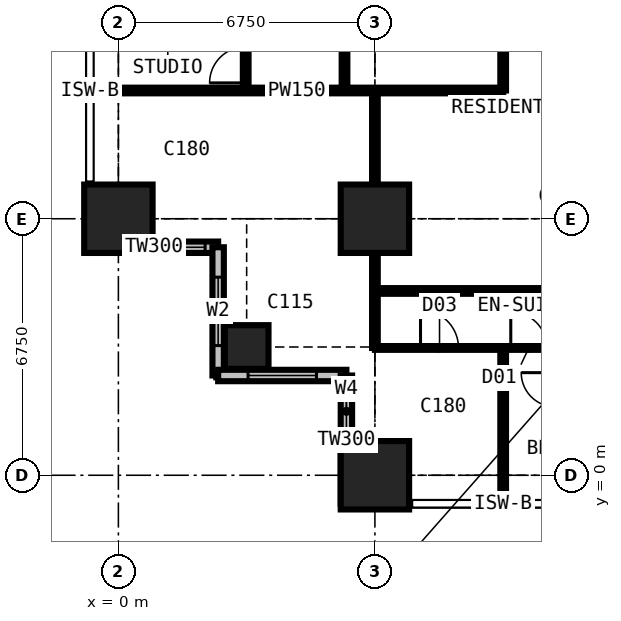
"""IFC4 building model, lengths in metres.
Left out: names, types, materials, properties, quantities, classifications, styles, units other than length and angle.
Written with IfcOpenShell. Run it as: python <this file> out.ifc"""

import sys

from ifc_helpers import new_model, si_unit, direction, frame, frame_2d, origin, origin_2d, place, context, subcontext, project, spatial, rectangle, extrude, element, fill, save


model = new_model("IFC4")
c1 = context("Model", 3, precision=1e-05, world=origin(), true_north=direction((0.0, 1.0)))
c2 = subcontext(c1, "Body", "Model", "MODEL_VIEW")
j1 = project(units=[si_unit("LENGTHUNIT", "METRE"), si_unit("PLANEANGLEUNIT", "RADIAN")], contexts=[c1])
p1 = place(None, origin())
s1 = spatial("IfcSite", under=j1, at=p1, CompositionType="ELEMENT")
p2 = place(p1, origin())
s2 = spatial("IfcBuilding", under=s1, at=p2, CompositionType="ELEMENT")
p3 = place(p2, frame((0.0, 0.0, 87.3)))
s3 = spatial("IfcBuildingStorey", under=s2, at=p3, CompositionType="ELEMENT", Elevation=87.3)
p4 = place(p3, frame((0.0, 6.75, 0.0), z_axis=(0.0, 0.0, 1.0), x_axis=(1.0, 0.0, 0.0)))
e1 = element("IfcColumn", 1, at=p4, inside=s3, PredefinedType="COLUMN", context=c2, shape_type="SweptSolid", body=[
    extrude(rectangle(XDim=1.8, YDim=1.8, at=origin_2d()), origin(), (0.0, 0.0, 1.0), 3.6),
])
p5 = place(p3, frame((3.375, 3.375, 0.0), z_axis=(0.0, 0.0, 1.0), x_axis=(1.0, 0.0, 0.0)))
e2 = element("IfcColumn", 2, at=p5, inside=s3, PredefinedType="COLUMN", context=c2, shape_type="SweptSolid", body=[
    extrude(rectangle(XDim=1.15, YDim=1.15, at=origin_2d()), origin(), (0.0, 0.0, 1.0), 3.6),
])
for number, where, z_axis, x_axis in (
    (3, (6.75, 0.0, 0.0), (0.0, 0.0, 1.0), (1.0, 0.0, 0.0)),
    (4, (6.75, 6.75, 0.0), (0.0, 0.0, 1.0), (1.0, 0.0, 0.0)),
):
    element("IfcColumn", number, at=place(p3, frame(where, z_axis=z_axis, x_axis=x_axis)), inside=s3, PredefinedType="COLUMN", context=c2, shape_type="SweptSolid", body=[
        extrude(rectangle(XDim=1.8, YDim=1.8, at=origin_2d()), origin(), (0.0, 0.0, 1.0), 3.6),
    ])
p6 = place(p3, frame((-0.75, 6.0, 0.0), z_axis=(0.0, 0.0, 1.0), x_axis=(1.0, 0.0, 0.0)))
e5 = element("IfcWall", 5, at=p6, inside=s3, PredefinedType="SOLIDWALL", context=c2, shape_type="SweptSolid", body=[
    extrude(rectangle(XDim=3.375, YDim=0.3, at=frame_2d((1.688, 0.0))), origin(), (0.0, 0.0, 1.0), 3.375),
])
p7 = place(p6, frame((1.833, 0.0, 0.9)))
e6 = element("IfcOpeningElement", 6, at=p7, cuts=e5, PredefinedType="OPENING", context=c2, shape_type="SweptSolid", body=[
    extrude(rectangle(XDim=1.2, YDim=1.8, at=frame_2d((0.6, 0.9))), frame((0.0, 0.16, 0.0), z_axis=(0.0, -1.0, 0.0), x_axis=(1.0, 0.0, 0.0)), (0.0, 0.0, 1.0), 0.32),
])
p8 = place(p3, frame((2.625, 6.0, 0.0), z_axis=(0.0, 0.0, 1.0), x_axis=(0.0, -1.0, 0.0)))
e7 = element("IfcWall", 7, at=p8, inside=s3, PredefinedType="SOLIDWALL", context=c2, shape_type="SweptSolid", body=[
    extrude(rectangle(XDim=3.375, YDim=0.3, at=frame_2d((1.688, 0.0))), origin(), (0.0, 0.0, 1.0), 3.375),
])
p9 = place(p8, frame((0.788, 0.0, 0.6)))
e8 = element("IfcOpeningElement", 8, at=p9, cuts=e7, PredefinedType="OPENING", context=c2, shape_type="SweptSolid", body=[
    extrude(rectangle(XDim=1.8, YDim=2.1, at=frame_2d((0.9, 1.05))), frame((0.0, 0.16, 0.0), z_axis=(0.0, -1.0, 0.0), x_axis=(1.0, 0.0, 0.0)), (0.0, 0.0, 1.0), 0.32),
])
p10 = place(p3, frame((2.625, 2.625, 0.0), z_axis=(0.0, 0.0, 1.0), x_axis=(1.0, 0.0, 0.0)))
e9 = element("IfcWall", 9, at=p10, inside=s3, PredefinedType="SOLIDWALL", context=c2, shape_type="SweptSolid", body=[
    extrude(rectangle(XDim=3.375, YDim=0.3, at=frame_2d((1.688, 0.0))), origin(), (0.0, 0.0, 1.0), 3.375),
])
p11 = place(p10, frame((0.788, 0.0, 0.6)))
e10 = element("IfcOpeningElement", 10, at=p11, cuts=e9, PredefinedType="OPENING", context=c2, shape_type="SweptSolid", body=[
    extrude(rectangle(XDim=1.8, YDim=2.1, at=frame_2d((0.9, 1.05))), frame((0.0, 0.16, 0.0), z_axis=(0.0, -1.0, 0.0), x_axis=(1.0, 0.0, 0.0)), (0.0, 0.0, 1.0), 0.32),
])
p12 = place(p3, frame((6.0, 2.625, 0.0), z_axis=(0.0, 0.0, 1.0), x_axis=(0.0, -1.0, 0.0)))
e11 = element("IfcWall", 11, at=p12, inside=s3, PredefinedType="SOLIDWALL", context=c2, shape_type="SweptSolid", body=[
    extrude(rectangle(XDim=3.375, YDim=0.3, at=frame_2d((1.688, 0.0))), origin(), (0.0, 0.0, 1.0), 3.375),
])
p13 = place(p12, frame((0.343, 0.0, 0.9)))
e12 = element("IfcOpeningElement", 12, at=p13, cuts=e11, PredefinedType="OPENING", context=c2, shape_type="SweptSolid", body=[
    extrude(rectangle(XDim=1.2, YDim=1.8, at=frame_2d((0.6, 0.9))), frame((0.0, 0.16, 0.0), z_axis=(0.0, -1.0, 0.0), x_axis=(1.0, 0.0, 0.0)), (0.0, 0.0, 1.0), 0.32),
])
p14 = place(p3, frame((-0.734, 10.125, 0.0), z_axis=(0.0, 0.0, 1.0), x_axis=(1.0, 0.0, 0.0)))
e13 = element("IfcWall", 13, at=p14, inside=s3, PredefinedType="PARTITIONING", context=c2, shape_type="SweptSolid", body=[
    extrude(rectangle(XDim=10.859, YDim=0.15, at=frame_2d((5.429, 0.0))), origin(), (0.0, 0.0, 1.0), 3.375),
])
p15 = place(p3, frame((3.35, 10.125, 0.0), z_axis=(0.0, 0.0, 1.0), x_axis=(0.0, 1.0, 0.0)))
e14 = element("IfcWall", 14, at=p15, inside=s3, PredefinedType="PARTITIONING", context=c2, shape_type="SweptSolid", body=[
    extrude(rectangle(XDim=16.875, YDim=0.15, at=frame_2d((8.438, 0.0))), origin(), (0.0, 0.0, 1.0), 3.375),
])
p16 = place(p15, frame((7.575, 0.0, 0.0)))
e15 = element("IfcOpeningElement", 15, at=p16, cuts=e14, PredefinedType="OPENING", context=c2, shape_type="SweptSolid", body=[
    extrude(rectangle(XDim=0.95, YDim=2.2, at=frame_2d((0.475, 1.1))), frame((0.0, 0.085, 0.0), z_axis=(0.0, -1.0, 0.0), x_axis=(1.0, 0.0, 0.0)), (0.0, 0.0, 1.0), 0.17),
])
p17 = place(p15, frame((0.2, 0.0, 0.0)))
e16 = element("IfcOpeningElement", 16, at=p17, cuts=e14, PredefinedType="OPENING", context=c2, shape_type="SweptSolid", body=[
    extrude(rectangle(XDim=0.95, YDim=2.2, at=frame_2d((0.475, 1.1))), frame((0.0, 0.085, 0.0), z_axis=(0.0, -1.0, 0.0), x_axis=(1.0, 0.0, 0.0)), (0.0, 0.0, 1.0), 0.17),
])
p18 = place(p15, frame((10.375, 0.0, 0.0)))
e17 = element("IfcOpeningElement", 17, at=p18, cuts=e14, PredefinedType="OPENING", context=c2, shape_type="SweptSolid", body=[
    extrude(rectangle(XDim=0.95, YDim=2.2, at=frame_2d((0.475, 1.1))), frame((0.0, 0.085, 0.0), z_axis=(0.0, -1.0, 0.0), x_axis=(1.0, 0.0, 0.0)), (0.0, 0.0, 1.0), 0.17),
])
p19 = place(p3, frame((5.95, 10.125, 0.0), z_axis=(0.0, 0.0, 1.0), x_axis=(0.0, 1.0, 0.0)))
e18 = element("IfcWall", 18, at=p19, inside=s3, PredefinedType="PARTITIONING", context=c2, shape_type="SweptSolid", body=[
    extrude(rectangle(XDim=2.65, YDim=0.15, at=frame_2d((1.325, 0.0))), origin(), (0.0, 0.0, 1.0), 3.375),
])
p20 = place(p3, frame((6.75, 3.35, 0.0), z_axis=(0.0, 0.0, 1.0), x_axis=(0.0, 1.0, 0.0)))
e19 = element("IfcWall", 19, at=p20, inside=s3, PredefinedType="PARTITIONING", context=c2, shape_type="SweptSolid", body=[
    extrude(rectangle(XDim=6.775, YDim=0.15, at=frame_2d((3.387, 0.0))), origin(), (0.0, 0.0, 1.0), 2.877),
])
p21 = place(p3, frame((6.75, 3.35, 0.0), z_axis=(0.0, 0.0, 1.0), x_axis=(1.0, 0.0, 0.0)))
e20 = element("IfcWall", 20, at=p21, inside=s3, PredefinedType="PARTITIONING", context=c2, shape_type="SweptSolid", body=[
    extrude(rectangle(XDim=23.625, YDim=0.1, at=frame_2d((11.812, 0.0))), origin(), (0.0, 0.0, 1.0), 3.375),
])
p22 = place(p21, frame((1.2, 0.0, 0.0)))
e21 = element("IfcOpeningElement", 21, at=p22, cuts=e20, PredefinedType="OPENING", context=c2, shape_type="SweptSolid", body=[
    extrude(rectangle(XDim=1.0, YDim=2.2, at=frame_2d((0.5, 1.1))), frame((0.0, 0.06, 0.0), z_axis=(0.0, -1.0, 0.0), x_axis=(1.0, 0.0, 0.0)), (0.0, 0.0, 1.0), 0.12),
])
p23 = place(p21, frame((3.575, 0.0, 0.0)))
e22 = element("IfcOpeningElement", 22, at=p23, cuts=e20, PredefinedType="OPENING", context=c2, shape_type="SweptSolid", body=[
    extrude(rectangle(XDim=0.95, YDim=2.2, at=frame_2d((0.475, 1.1))), frame((0.0, 0.06, 0.0), z_axis=(0.0, -1.0, 0.0), x_axis=(1.0, 0.0, 0.0)), (0.0, 0.0, 1.0), 0.12),
])
p24 = place(p21, frame((6.95, 0.0, 0.0)))
e23 = element("IfcOpeningElement", 23, at=p24, cuts=e20, PredefinedType="OPENING", context=c2, shape_type="SweptSolid", body=[
    extrude(rectangle(XDim=0.95, YDim=2.2, at=frame_2d((0.475, 1.1))), frame((0.0, 0.06, 0.0), z_axis=(0.0, -1.0, 0.0), x_axis=(1.0, 0.0, 0.0)), (0.0, 0.0, 1.0), 0.12),
])
p25 = place(p21, frame((10.325, 0.0, 0.0)))
e24 = element("IfcOpeningElement", 24, at=p25, cuts=e20, PredefinedType="OPENING", context=c2, shape_type="SweptSolid", body=[
    extrude(rectangle(XDim=0.95, YDim=2.2, at=frame_2d((0.475, 1.1))), frame((0.0, 0.06, 0.0), z_axis=(0.0, -1.0, 0.0), x_axis=(1.0, 0.0, 0.0)), (0.0, 0.0, 1.0), 0.12),
])
p26 = place(p21, frame((15.1, 0.0, 0.0)))
e25 = element("IfcOpeningElement", 25, at=p26, cuts=e20, PredefinedType="OPENING", context=c2, shape_type="SweptSolid", body=[
    extrude(rectangle(XDim=0.95, YDim=2.2, at=frame_2d((0.475, 1.1))), frame((0.0, 0.06, 0.0), z_axis=(0.0, -1.0, 0.0), x_axis=(1.0, 0.0, 0.0)), (0.0, 0.0, 1.0), 0.12),
])
p27 = place(p21, frame((20.45, 0.0, 0.0)))
e26 = element("IfcOpeningElement", 26, at=p27, cuts=e20, PredefinedType="OPENING", context=c2, shape_type="SweptSolid", body=[
    extrude(rectangle(XDim=0.95, YDim=2.2, at=frame_2d((0.475, 1.1))), frame((0.0, 0.06, 0.0), z_axis=(0.0, -1.0, 0.0), x_axis=(1.0, 0.0, 0.0)), (0.0, 0.0, 1.0), 0.12),
])
p28 = place(p3, frame((6.75, 4.85, 0.0), z_axis=(0.0, 0.0, 1.0), x_axis=(1.0, 0.0, 0.0)))
e27 = element("IfcWall", 27, at=p28, inside=s3, PredefinedType="PARTITIONING", context=c2, shape_type="SweptSolid", body=[
    extrude(rectangle(XDim=11.05, YDim=0.15, at=frame_2d((5.525, 0.0))), origin(), (0.0, 0.0, 1.0), 3.375),
])
p29 = place(p3, frame((10.125, -0.734, 0.0), z_axis=(0.0, 0.0, 1.0), x_axis=(0.0, 1.0, 0.0)))
e28 = element("IfcWall", 28, at=p29, inside=s3, PredefinedType="PARTITIONING", context=c2, shape_type="SweptSolid", body=[
    extrude(rectangle(XDim=4.084, YDim=0.15, at=frame_2d((2.042, 0.0))), origin(), (0.0, 0.0, 1.0), 3.375),
])
p30 = place(p3, frame((10.125, 10.125, 0.0), z_axis=(0.0, 0.0, 1.0), x_axis=(0.0, 1.0, 0.0)))
e29 = element("IfcWall", 29, at=p30, inside=s3, PredefinedType="PARTITIONING", context=c2, shape_type="SweptSolid", body=[
    extrude(rectangle(XDim=1.175, YDim=0.15, at=frame_2d((0.587, 0.0))), origin(), (0.0, 0.0, 1.0), 3.375),
])
p31 = place(p7, origin())
e30 = element("IfcWindow", 30, at=p31, inside=s3, PartitioningType="SINGLE_PANEL", PredefinedType="WINDOW", context=c2, shape_type="SweptSolid", body=[
    extrude(rectangle(XDim=1.2, YDim=1.8, at=frame_2d((0.6, 0.9))), frame((0.0, 0.03, 0.0), z_axis=(0.0, -1.0, 0.0), x_axis=(1.0, 0.0, 0.0)), (0.0, 0.0, 1.0), 0.06),
])
fill(e6, e30)
p32 = place(p9, origin())
e31 = element("IfcWindow", 31, at=p32, inside=s3, PartitioningType="SINGLE_PANEL", PredefinedType="WINDOW", context=c2, shape_type="SweptSolid", body=[
    extrude(rectangle(XDim=1.8, YDim=2.1, at=frame_2d((0.9, 1.05))), frame((0.0, 0.03, 0.0), z_axis=(0.0, -1.0, 0.0), x_axis=(1.0, 0.0, 0.0)), (0.0, 0.0, 1.0), 0.06),
])
fill(e8, e31)
p33 = place(p11, origin())
e32 = element("IfcWindow", 32, at=p33, inside=s3, PartitioningType="SINGLE_PANEL", PredefinedType="WINDOW", context=c2, shape_type="SweptSolid", body=[
    extrude(rectangle(XDim=1.8, YDim=2.1, at=frame_2d((0.9, 1.05))), frame((0.0, 0.03, 0.0), z_axis=(0.0, -1.0, 0.0), x_axis=(1.0, 0.0, 0.0)), (0.0, 0.0, 1.0), 0.06),
])
fill(e10, e32)
p34 = place(p13, origin())
e33 = element("IfcWindow", 33, at=p34, inside=s3, PartitioningType="SINGLE_PANEL", PredefinedType="WINDOW", context=c2, shape_type="SweptSolid", body=[
    extrude(rectangle(XDim=1.2, YDim=1.8, at=frame_2d((0.6, 0.9))), frame((0.0, 0.03, 0.0), z_axis=(0.0, -1.0, 0.0), x_axis=(1.0, 0.0, 0.0)), (0.0, 0.0, 1.0), 0.06),
])
fill(e12, e33)
p35 = place(p22, origin())
e34 = element("IfcDoor", 34, at=p35, inside=s3, OperationType="SINGLE_SWING_LEFT", PredefinedType="DOOR", context=c2, shape_type="SweptSolid", body=[
    extrude(rectangle(XDim=1.0, YDim=2.2, at=frame_2d((0.5, 1.1))), frame((0.0, 0.025, 0.0), z_axis=(0.0, -1.0, 0.0), x_axis=(1.0, 0.0, 0.0)), (0.0, 0.0, 1.0), 0.05),
])
fill(e21, e34)
p36 = place(p23, origin())
e35 = element("IfcDoor", 35, at=p36, inside=s3, OperationType="SINGLE_SWING_LEFT", PredefinedType="DOOR", context=c2, shape_type="SweptSolid", body=[
    extrude(rectangle(XDim=0.95, YDim=2.2, at=frame_2d((0.475, 1.1))), frame((0.0, 0.025, 0.0), z_axis=(0.0, -1.0, 0.0), x_axis=(1.0, 0.0, 0.0)), (0.0, 0.0, 1.0), 0.05),
])
fill(e22, e35)
p37 = place(p17, origin())
e36 = element("IfcDoor", 36, at=p37, inside=s3, OperationType="SINGLE_SWING_LEFT", PredefinedType="DOOR", context=c2, shape_type="SweptSolid", body=[
    extrude(rectangle(XDim=0.95, YDim=2.2, at=frame_2d((0.475, 1.1))), frame((0.0, 0.025, 0.0), z_axis=(0.0, -1.0, 0.0), x_axis=(1.0, 0.0, 0.0)), (0.0, 0.0, 1.0), 0.05),
])
fill(e16, e36)
save(model, sys.argv[1])
